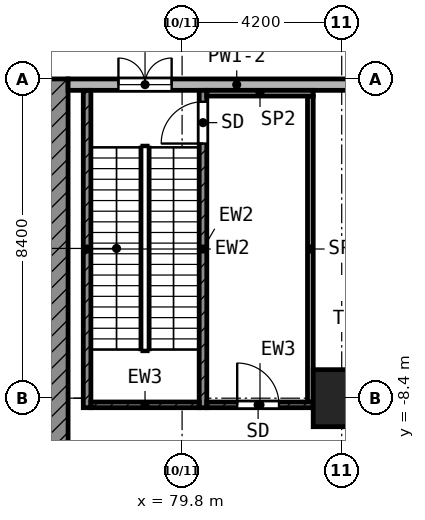
"""IFC4 building model, lengths in metres.
Left out: names, types, materials, properties, quantities, classifications, styles, units other than length and angle.
Written with IfcOpenShell. Run it as: python <this file> out.ifc"""

import sys

from ifc_helpers import new_model, si_unit, direction, frame, frame_2d, origin, origin_2d, place, context, subcontext, project, spatial, polyline, rectangle, outline, extrude, element, fill, save


model = new_model("IFC4")
c1 = context("Model", 3, precision=1e-05, world=origin(), true_north=direction((0.0, 1.0)))
c2 = subcontext(c1, "Body", "Model", "MODEL_VIEW")
j1 = project(units=[si_unit("LENGTHUNIT", "METRE"), si_unit("PLANEANGLEUNIT", "RADIAN")], contexts=[c1])
p1 = place(None, origin())
s1 = spatial("IfcSite", under=j1, at=p1, CompositionType="ELEMENT")
p2 = place(p1, origin())
s2 = spatial("IfcBuilding", under=s1, at=p2, CompositionType="ELEMENT")
p3 = place(p2, origin())
s3 = spatial("IfcBuildingStorey", under=s2, at=p3, CompositionType="ELEMENT", Elevation=0.0)
p4 = place(p3, frame((84.0, -8.4, 0.0), z_axis=(0.0, 0.0, 1.0), x_axis=(1.0, 0.0, 0.0)))
e1 = element("IfcColumn", 1, at=p4, inside=s3, PredefinedType="COLUMN", context=c2, shape_type="SweptSolid", body=[
    extrude(rectangle(XDim=1.5, YDim=1.5, at=origin_2d()), origin(), (0.0, 0.0, 1.0), 7.0),
])
p5 = place(p3, frame((0.0, 0.0, 0.0), z_axis=(0.0, -1.0, 0.0), x_axis=(1.0, 0.0, 0.0)))
e2 = element("IfcWall", 2, at=p5, inside=s3, PredefinedType="SHEAR", context=c2, shape_type="SweptSolid", body=[
    extrude(outline(polyline([(74.4, 0.0), (74.4, 2.25), (74.4, 4.5), (74.4, 6.75), (74.4, 7.0), (76.8, 7.0), (76.8, 0.0), (74.4, 0.0)])), origin(), (0.0, 0.0, 1.0), 33.6),
])
p6 = place(p3, frame((85.675, -0.15, 0.0), z_axis=(0.0, 0.0, 1.0), x_axis=(-1.0, 0.0, 0.0)))
e3 = element("IfcWall", 3, at=p6, inside=s3, PredefinedType="SOLIDWALL", context=c2, shape_type="SweptSolid", body=[
    extrude(rectangle(XDim=8.875, YDim=0.3, at=frame_2d((4.438, 0.0))), origin(), (0.0, 0.0, 1.0), 6.65),
])
p7 = place(p6, frame((6.15, 0.0, 0.0)))
e4 = element("IfcOpeningElement", 4, at=p7, cuts=e3, PredefinedType="OPENING", context=c2, shape_type="SweptSolid", body=[
    extrude(rectangle(XDim=1.4, YDim=2.1, at=frame_2d((0.7, 1.05))), frame((0.0, 0.16, 0.0), z_axis=(0.0, -1.0, 0.0), x_axis=(1.0, 0.0, 0.0)), (0.0, 0.0, 1.0), 0.32),
])
p8 = place(p3, frame((77.3, -8.65, 0.0), z_axis=(0.0, 0.0, 1.0), x_axis=(0.0, 1.0, 0.0)))
e5 = element("IfcWall", 5, at=p8, inside=s3, PredefinedType="SHEAR", context=c2, shape_type="SweptSolid", body=[
    extrude(rectangle(XDim=8.35, YDim=0.2, at=frame_2d((4.175, 0.0))), origin(), (0.0, 0.0, 1.0), 6.65),
])
p9 = place(p3, frame((80.35, -8.65, 0.0), z_axis=(0.0, 0.0, 1.0), x_axis=(0.0, 1.0, 0.0)))
e6 = element("IfcWall", 6, at=p9, inside=s3, PredefinedType="SHEAR", context=c2, shape_type="SweptSolid", body=[
    extrude(rectangle(XDim=8.35, YDim=0.2, at=frame_2d((4.175, 0.0))), origin(), (0.0, 0.0, 1.0), 6.65),
])
p10 = place(p9, frame((6.95, 0.0, 0.0)))
e7 = element("IfcOpeningElement", 7, at=p10, cuts=e6, PredefinedType="OPENING", context=c2, shape_type="SweptSolid", body=[
    extrude(rectangle(XDim=1.1, YDim=2.1, at=frame_2d((0.55, 1.05))), frame((0.0, 0.11, 0.0), z_axis=(0.0, -1.0, 0.0), x_axis=(1.0, 0.0, 0.0)), (0.0, 0.0, 1.0), 0.22),
])
p11 = place(p3, frame((80.45, -0.375, 0.0), z_axis=(0.0, 0.0, 1.0), x_axis=(1.0, 0.0, 0.0)))
e8 = element("IfcWall", 8, at=p11, inside=s3, PredefinedType="PARTITIONING", context=c2, shape_type="SweptSolid", body=[
    extrude(rectangle(XDim=2.8, YDim=0.15, at=frame_2d((1.4, 0.0))), origin(), (0.0, 0.0, 1.0), 6.65),
])
p12 = place(p3, frame((77.4, -8.575, 0.0), z_axis=(0.0, 0.0, 1.0), x_axis=(1.0, 0.0, 0.0)))
e9 = element("IfcWall", 9, at=p12, inside=s3, PredefinedType="SHEAR", context=c2, shape_type="SweptSolid", body=[
    extrude(rectangle(XDim=2.85, YDim=0.15, at=frame_2d((1.425, 0.0))), origin(), (0.0, 0.0, 1.0), 6.65),
])
p13 = place(p3, frame((80.45, -8.575, 0.0), z_axis=(0.0, 0.0, 1.0), x_axis=(1.0, 0.0, 0.0)))
e10 = element("IfcWall", 10, at=p13, inside=s3, PredefinedType="SHEAR", context=c2, shape_type="SweptSolid", body=[
    extrude(rectangle(XDim=2.8, YDim=0.15, at=frame_2d((1.4, 0.0))), origin(), (0.0, 0.0, 1.0), 6.65),
])
p14 = place(p13, frame((0.8, 0.0, 0.0)))
e11 = element("IfcOpeningElement", 11, at=p14, cuts=e10, PredefinedType="OPENING", context=c2, shape_type="SweptSolid", body=[
    extrude(rectangle(XDim=1.1, YDim=2.1, at=frame_2d((0.55, 1.05))), frame((0.0, 0.085, 0.0), z_axis=(0.0, -1.0, 0.0), x_axis=(1.0, 0.0, 0.0)), (0.0, 0.0, 1.0), 0.17),
])
p15 = place(p3, frame((83.175, -8.5, 0.0), z_axis=(0.0, 0.0, 1.0), x_axis=(0.0, 1.0, 0.0)))
e12 = element("IfcWall", 12, at=p15, inside=s3, PredefinedType="PARTITIONING", context=c2, shape_type="SweptSolid", body=[
    extrude(rectangle(XDim=8.05, YDim=0.15, at=frame_2d((4.025, 0.0))), origin(), (0.0, 0.0, 1.0), 6.65),
])
p16 = place(p3, frame((83.25, -8.4, 0.0), z_axis=(0.0, 0.0, 1.0), x_axis=(1.0, 0.0, 0.0)))
e13 = element("IfcWall", 13, at=p16, inside=s3, PredefinedType="PARTITIONING", context=c2, shape_type="SweptSolid", body=[
    extrude(rectangle(XDim=8.85, YDim=0.15, at=frame_2d((4.425, 0.0))), origin(), (0.0, 0.0, 1.0), 5.25),
])
p17 = place(p16, frame((1.875, 0.0, 0.0)))
e14 = element("IfcOpeningElement", 14, at=p17, cuts=e13, PredefinedType="OPENING", context=c2, shape_type="SweptSolid", body=[
    extrude(rectangle(XDim=1.2, YDim=2.1, at=frame_2d((0.6, 1.05))), frame((0.0, 0.085, 0.0), z_axis=(0.0, -1.0, 0.0), x_axis=(1.0, 0.0, 0.0)), (0.0, 0.0, 1.0), 0.17),
])
p18 = place(p16, frame((6.45, 0.0, 0.0)))
e15 = element("IfcOpeningElement", 15, at=p18, cuts=e13, PredefinedType="OPENING", context=c2, shape_type="SweptSolid", body=[
    extrude(rectangle(XDim=1.2, YDim=2.1, at=frame_2d((0.6, 1.05))), frame((0.0, 0.085, 0.0), z_axis=(0.0, -1.0, 0.0), x_axis=(1.0, 0.0, 0.0)), (0.0, 0.0, 1.0), 0.17),
])
p19 = place(p7, frame((1.4, 0.0, 0.0), z_axis=(0.0, 0.0, 1.0), x_axis=(-1.0, 0.0, 0.0)))
e16 = element("IfcDoor", 16, at=p19, inside=s3, OperationType="DOUBLE_DOOR_SINGLE_SWING", PredefinedType="DOOR", context=c2, shape_type="SweptSolid", body=[
    extrude(rectangle(XDim=1.4, YDim=2.1, at=frame_2d((0.7, 1.05))), frame((0.0, 0.025, 0.0), z_axis=(0.0, -1.0, 0.0), x_axis=(1.0, 0.0, 0.0)), (0.0, 0.0, 1.0), 0.05),
])
fill(e4, e16)
p20 = place(p10, origin())
e17 = element("IfcDoor", 17, at=p20, inside=s3, OperationType="SINGLE_SWING_LEFT", PredefinedType="DOOR", context=c2, shape_type="SweptSolid", body=[
    extrude(rectangle(XDim=1.1, YDim=2.1, at=frame_2d((0.55, 1.05))), frame((0.0, 0.025, 0.0), z_axis=(0.0, -1.0, 0.0), x_axis=(1.0, 0.0, 0.0)), (0.0, 0.0, 1.0), 0.05),
])
fill(e7, e17)
p21 = place(p14, origin())
e18 = element("IfcDoor", 18, at=p21, inside=s3, OperationType="SINGLE_SWING_LEFT", PredefinedType="DOOR", context=c2, shape_type="SweptSolid", body=[
    extrude(rectangle(XDim=1.1, YDim=2.1, at=frame_2d((0.55, 1.05))), frame((0.0, 0.025, 0.0), z_axis=(0.0, -1.0, 0.0), x_axis=(1.0, 0.0, 0.0)), (0.0, 0.0, 1.0), 0.05),
])
fill(e11, e18)
save(model, sys.argv[1])
